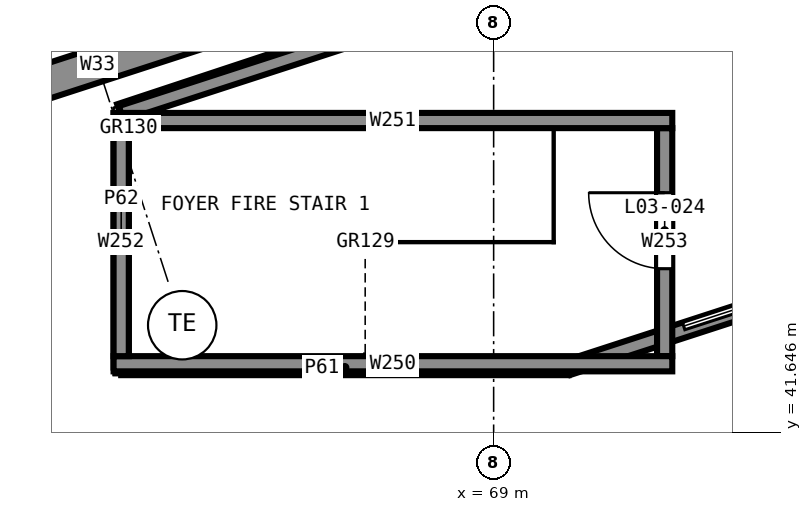
"""IFC4 building model, lengths in metres.
Left out: names, types, materials, properties, quantities, classifications, styles, units other than length and angle.
Written with IfcOpenShell. Run it as: python <this file> out.ifc"""

import sys

from ifc_helpers import new_model, si_unit, direction, frame, frame_2d, origin, place, context, subcontext, project, spatial, rectangle, extrude, element, fill, save


model = new_model("IFC4")
c1 = context("Model", 3, precision=1e-05, world=origin(), true_north=direction((0.0, 1.0)))
c2 = subcontext(c1, "Body", "Model", "MODEL_VIEW")
j1 = project(units=[si_unit("LENGTHUNIT", "METRE"), si_unit("PLANEANGLEUNIT", "RADIAN")], contexts=[c1])
p1 = place(None, origin())
s1 = spatial("IfcSite", under=j1, at=p1, CompositionType="ELEMENT")
p2 = place(p1, origin())
s2 = spatial("IfcBuilding", under=s1, at=p2, CompositionType="ELEMENT")
p3 = place(p2, frame((0.0, 0.0, 13.5)))
s3 = spatial("IfcBuildingStorey", under=s2, at=p3, CompositionType="ELEMENT", Elevation=13.5)
p4 = place(p3, frame((49.786, 41.93, 0.0), z_axis=(0.0, 0.0, 1.0), x_axis=(0.951055937194, 0.309018776661, 0.0)))
e1 = element("IfcWall", 1, at=p4, inside=s3, PredefinedType="SHEAR", context=c2, shape_type="SweptSolid", body=[
    extrude(rectangle(XDim=29.45, YDim=0.45, at=frame_2d((14.725, 0.0))), origin(), (0.0, 0.0, 1.0), 4.0),
])
for number, where, z_axis, x_axis in (
    (2, (64.0, 42.55, 0.0), (0.0, 0.0, 1.0), (1.0, 0.0, 0.0)),
    (3, (71.35, 45.75, 0.0), (0.0, 0.0, 1.0), (-1.0, 0.0, 0.0)),
):
    element("IfcWall", number, at=place(p3, frame(where, z_axis=z_axis, x_axis=x_axis)), inside=s3, PredefinedType="SHEAR", context=c2, shape_type="SweptSolid", body=[
        extrude(rectangle(XDim=7.35, YDim=0.2, at=frame_2d((3.675, 0.0))), origin(), (0.0, 0.0, 1.0), 3.7),
    ])
p5 = place(p3, frame((64.1, 45.65, 0.0), z_axis=(0.0, 0.0, 1.0), x_axis=(0.0, -1.0, 0.0)))
e4 = element("IfcWall", 4, at=p5, inside=s3, PredefinedType="SHEAR", context=c2, shape_type="SweptSolid", body=[
    extrude(rectangle(XDim=3.0, YDim=0.2, at=frame_2d((1.5, 0.0))), origin(), (0.0, 0.0, 1.0), 3.7),
])
p6 = place(p3, frame((71.25, 42.65, 0.0), z_axis=(0.0, 0.0, 1.0), x_axis=(0.0, 1.0, 0.0)))
e5 = element("IfcWall", 5, at=p6, inside=s3, PredefinedType="SHEAR", context=c2, shape_type="SweptSolid", body=[
    extrude(rectangle(XDim=3.0, YDim=0.2, at=frame_2d((1.5, 0.0))), origin(), (0.0, 0.0, 1.0), 3.7),
])
p7 = place(p6, frame((1.15, 0.0, 0.0)))
e6 = element("IfcOpeningElement", 6, at=p7, cuts=e5, PredefinedType="OPENING", context=c2, shape_type="SweptSolid", body=[
    extrude(rectangle(XDim=1.0, YDim=2.1, at=frame_2d((0.5, 1.05))), frame((0.0, 0.11, 0.0), z_axis=(0.0, -1.0, 0.0), x_axis=(1.0, 0.0, 0.0)), (0.0, 0.0, 1.0), 0.22),
])
p8 = place(p3, frame((64.081, 45.859, 0.0), z_axis=(0.0, 0.0, 1.0), x_axis=(0.949388338269, 0.314104732786, 0.0)))
e7 = element("IfcWall", 7, at=p8, inside=s3, PredefinedType="SOLIDWALL", context=c2, shape_type="SweptSolid", body=[
    extrude(rectangle(XDim=15.116, YDim=0.22, at=frame_2d((7.558, 0.0))), origin(), (0.0, 0.0, 1.0), 3.7),
])
p9 = place(p3, frame((78.624, 45.307, 4.0), z_axis=(0.0, 0.0, 1.0), x_axis=(-0.951058555726, -0.309010717581, 0.0)))
e8 = element("IfcWall", 8, at=p9, inside=s3, PredefinedType="PARAPET", context=c2, shape_type="SweptSolid", body=[
    extrude(rectangle(XDim=9.084, YDim=0.2, at=frame_2d((4.542, 0.0))), origin(), (0.0, 0.0, 1.0), 1.1),
])
p10 = place(p3, frame((69.984, 42.5, 4.0), z_axis=(0.0, 0.0, 1.0), x_axis=(-1.0, 0.0, 0.0)))
e9 = element("IfcWall", 9, at=p10, inside=s3, PredefinedType="PARAPET", context=c2, shape_type="SweptSolid", body=[
    extrude(rectangle(XDim=5.884, YDim=0.2, at=frame_2d((2.942, 0.0))), origin(), (0.0, 0.0, 1.0), 1.1),
])
p11 = place(p3, frame((64.1, 42.5, 4.0), z_axis=(0.0, 0.0, 1.0), x_axis=(0.0, 1.0, 0.0)))
e10 = element("IfcWall", 10, at=p11, inside=s3, PredefinedType="PARAPET", context=c2, shape_type="SweptSolid", body=[
    extrude(rectangle(XDim=3.345, YDim=0.2, at=frame_2d((1.673, 0.0))), origin(), (0.0, 0.0, 1.0), 1.1),
])
p12 = place(p3, frame((64.1, 45.845, 4.0), z_axis=(0.0, 0.0, 1.0), x_axis=(0.951050343429, 0.309035991858, 0.0)))
e11 = element("IfcWall", 11, at=p12, inside=s3, PredefinedType="PARAPET", context=c2, shape_type="SweptSolid", body=[
    extrude(rectangle(XDim=15.102, YDim=0.2, at=frame_2d((7.551, 0.0))), origin(), (0.0, 0.0, 1.0), 1.1),
])
p13 = place(p7, origin())
e12 = element("IfcDoor", 12, at=p13, inside=s3, OperationType="SINGLE_SWING_LEFT", PredefinedType="DOOR", context=c2, shape_type="SweptSolid", body=[
    extrude(rectangle(XDim=1.0, YDim=2.1, at=frame_2d((0.5, 1.05))), frame((0.0, 0.025, 0.0), z_axis=(0.0, -1.0, 0.0), x_axis=(1.0, 0.0, 0.0)), (0.0, 0.0, 1.0), 0.05),
])
fill(e6, e12)
save(model, sys.argv[1])
